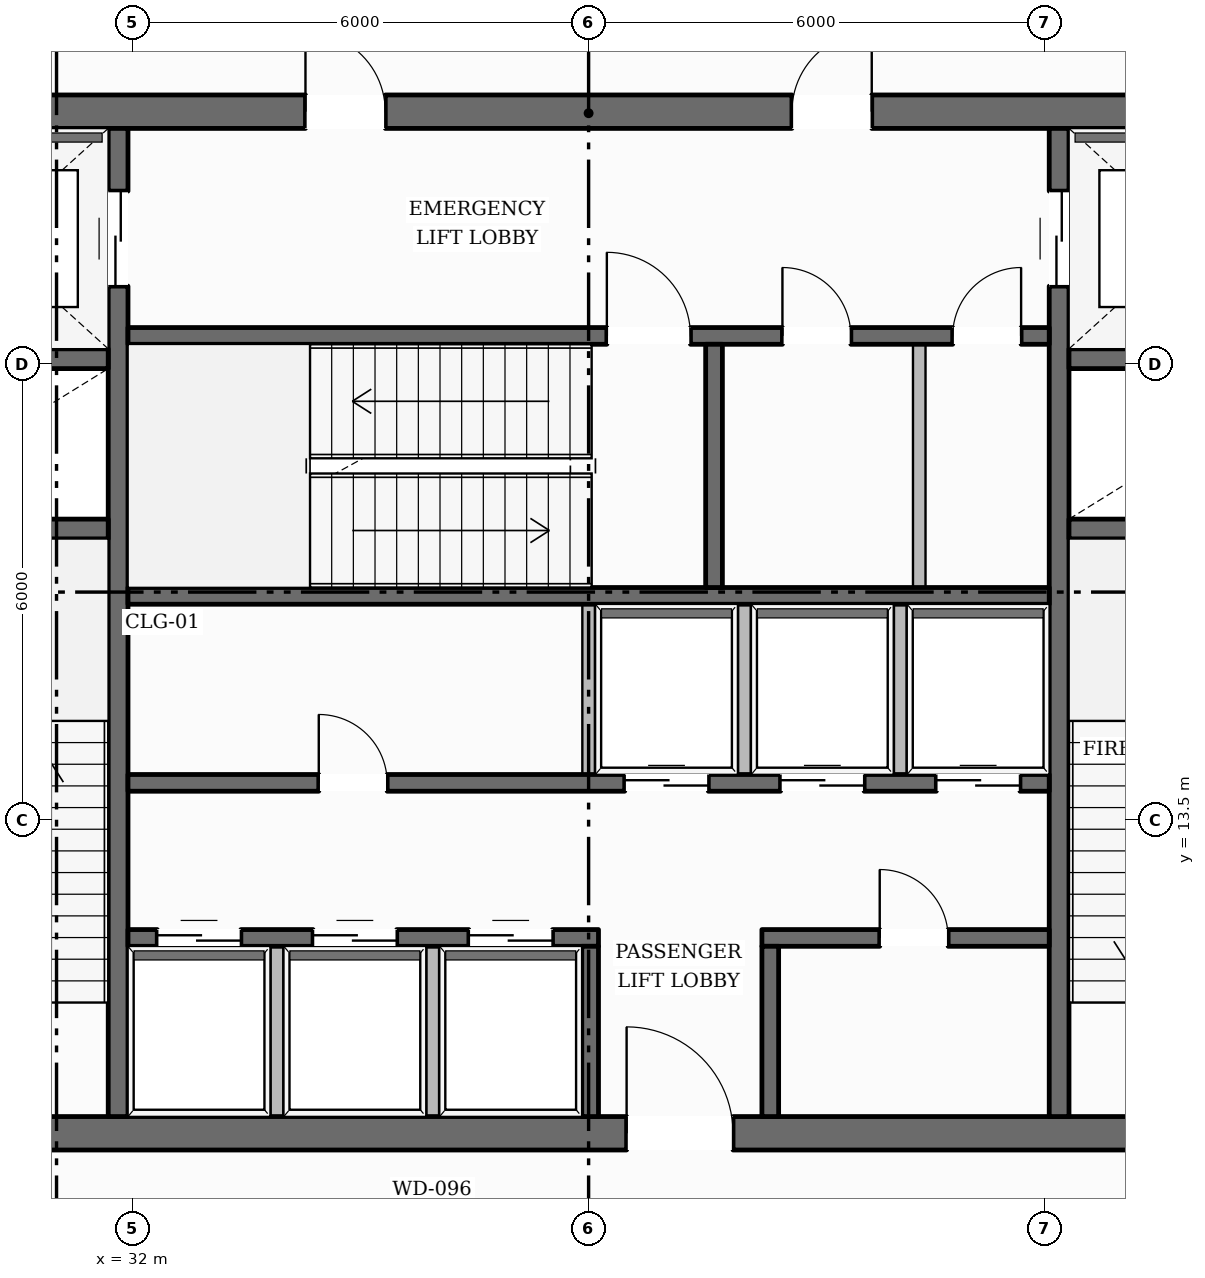
"""IFC4 building model, lengths in metres.
Left out: names, types, materials, properties, quantities, classifications, styles, units other than length and angle.
Written with IfcOpenShell. Run it as: python <this file> out.ifc"""

import sys

from ifc_helpers import new_model, si_unit, direction, frame, frame_2d, origin, place, context, subcontext, project, spatial, rectangle, extrude, element, fill, save


model = new_model("IFC4")
c1 = context("Model", 3, precision=1e-05, world=origin(), true_north=direction((0.0, 1.0)))
c2 = subcontext(c1, "Body", "Model", "MODEL_VIEW")
j1 = project(units=[si_unit("LENGTHUNIT", "METRE"), si_unit("PLANEANGLEUNIT", "RADIAN")], contexts=[c1])
p1 = place(None, origin())
s1 = spatial("IfcSite", under=j1, at=p1, CompositionType="ELEMENT")
p2 = place(p1, origin())
s2 = spatial("IfcBuilding", under=s1, at=p2, CompositionType="ELEMENT")
p3 = place(p2, frame((0.0, 0.0, 160.0)))
s3 = spatial("IfcBuildingStorey", under=s2, at=p3, CompositionType="ELEMENT", Elevation=160.0)
p4 = place(p3, frame((28.04, 9.38, 0.0), z_axis=(0.0, 0.0, 1.0), x_axis=(1.0, 0.0, 0.0)))
e1 = element("IfcWall", 1, at=p4, inside=s3, PredefinedType="SOLIDWALL", context=c2, shape_type="SweptSolid", body=[
    extrude(rectangle(XDim=19.92, YDim=0.44, at=frame_2d((9.96, 0.0))), origin(), (0.0, 0.0, 1.0), 4.75),
])
p5 = place(p4, frame((10.46, 0.0, 0.0)))
e2 = element("IfcOpeningElement", 2, at=p5, cuts=e1, PredefinedType="OPENING", context=c2, shape_type="SweptSolid", body=[
    extrude(rectangle(XDim=1.4, YDim=2.2, at=frame_2d((0.7, 1.1))), frame((0.0, 0.23, 0.0), z_axis=(0.0, -1.0, 0.0), x_axis=(1.0, 0.0, 0.0)), (0.0, 0.0, 1.0), 0.46),
])
p6 = place(p3, frame((28.04, 22.82, 0.0), z_axis=(0.0, 0.0, 1.0), x_axis=(1.0, 0.0, 0.0)))
e3 = element("IfcWall", 3, at=p6, inside=s3, PredefinedType="SOLIDWALL", context=c2, shape_type="SweptSolid", body=[
    extrude(rectangle(XDim=19.92, YDim=0.44, at=frame_2d((9.96, 0.0))), origin(), (0.0, 0.0, 1.0), 4.75),
])
p7 = place(p6, frame((6.235, 0.0, 0.0)))
e4 = element("IfcOpeningElement", 4, at=p7, cuts=e3, PredefinedType="OPENING", context=c2, shape_type="SweptSolid", body=[
    extrude(rectangle(XDim=1.05, YDim=2.15, at=frame_2d((0.525, 1.075))), frame((0.0, 0.23, 0.0), z_axis=(0.0, -1.0, 0.0), x_axis=(1.0, 0.0, 0.0)), (0.0, 0.0, 1.0), 0.46),
])
p8 = place(p6, frame((12.635, 0.0, 0.0)))
e5 = element("IfcOpeningElement", 5, at=p8, cuts=e3, PredefinedType="OPENING", context=c2, shape_type="SweptSolid", body=[
    extrude(rectangle(XDim=1.05, YDim=2.15, at=frame_2d((0.525, 1.075))), frame((0.0, 0.23, 0.0), z_axis=(0.0, -1.0, 0.0), x_axis=(1.0, 0.0, 0.0)), (0.0, 0.0, 1.0), 0.46),
])
p9 = place(p3, frame((31.81, 9.6, 0.0), z_axis=(0.0, 0.0, 1.0), x_axis=(0.0, 1.0, 0.0)))
e6 = element("IfcWall", 6, at=p9, inside=s3, PredefinedType="SHEAR", context=c2, shape_type="SweptSolid", body=[
    extrude(rectangle(XDim=13.0, YDim=0.26, at=frame_2d((6.5, 0.0))), origin(), (0.0, 0.0, 1.0), 4.75),
])
p10 = place(p9, frame((10.925, 0.0, 0.0)))
e7 = element("IfcOpeningElement", 7, at=p10, cuts=e6, PredefinedType="OPENING", context=c2, shape_type="SweptSolid", body=[
    extrude(rectangle(XDim=1.25, YDim=2.25, at=frame_2d((0.625, 1.125))), frame((0.0, 0.14, 0.0), z_axis=(0.0, -1.0, 0.0), x_axis=(1.0, 0.0, 0.0)), (0.0, 0.0, 1.0), 0.28),
])
p11 = place(p3, frame((44.19, 9.6, 0.0), z_axis=(0.0, 0.0, 1.0), x_axis=(0.0, 1.0, 0.0)))
e8 = element("IfcWall", 8, at=p11, inside=s3, PredefinedType="SHEAR", context=c2, shape_type="SweptSolid", body=[
    extrude(rectangle(XDim=13.0, YDim=0.26, at=frame_2d((6.5, 0.0))), origin(), (0.0, 0.0, 1.0), 4.75),
])
p12 = place(p11, frame((10.925, 0.0, 0.0)))
e9 = element("IfcOpeningElement", 9, at=p12, cuts=e8, PredefinedType="OPENING", context=c2, shape_type="SweptSolid", body=[
    extrude(rectangle(XDim=1.25, YDim=2.25, at=frame_2d((0.625, 1.125))), frame((0.0, 0.14, 0.0), z_axis=(0.0, -1.0, 0.0), x_axis=(1.0, 0.0, 0.0)), (0.0, 0.0, 1.0), 0.28),
])
for number, where, z_axis, x_axis in (
    (10, (28.48, 17.33, 0.0), (0.0, 0.0, 1.0), (1.0, 0.0, 0.0)),
    (11, (28.48, 19.57, 0.0), (0.0, 0.0, 1.0), (1.0, 0.0, 0.0)),
    (12, (44.32, 17.33, 0.0), (0.0, 0.0, 1.0), (1.0, 0.0, 0.0)),
    (13, (44.32, 19.57, 0.0), (0.0, 0.0, 1.0), (1.0, 0.0, 0.0)),
):
    element("IfcWall", number, at=place(p3, frame(where, z_axis=z_axis, x_axis=x_axis)), inside=s3, PredefinedType="SHEAR", context=c2, shape_type="SweptSolid", body=[
        extrude(rectangle(XDim=3.2, YDim=0.26, at=frame_2d((1.6, 0.0))), origin(), (0.0, 0.0, 1.0), 4.75),
    ])
p13 = place(p3, frame((31.94, 19.87, 0.0), z_axis=(0.0, 0.0, 1.0), x_axis=(1.0, 0.0, 0.0)))
e14 = element("IfcWall", 14, at=p13, inside=s3, PredefinedType="SOLIDWALL", context=c2, shape_type="SweptSolid", body=[
    extrude(rectangle(XDim=12.12, YDim=0.22, at=frame_2d((6.06, 0.0))), origin(), (0.0, 0.0, 1.0), 4.75),
])
p14 = place(p13, frame((6.3, 0.0, 0.0)))
e15 = element("IfcOpeningElement", 15, at=p14, cuts=e14, PredefinedType="OPENING", context=c2, shape_type="SweptSolid", body=[
    extrude(rectangle(XDim=1.1, YDim=2.15, at=frame_2d((0.55, 1.075))), frame((0.0, 0.12, 0.0), z_axis=(0.0, -1.0, 0.0), x_axis=(1.0, 0.0, 0.0)), (0.0, 0.0, 1.0), 0.24),
])
p15 = place(p13, frame((8.61, 0.0, 0.0)))
e16 = element("IfcOpeningElement", 16, at=p15, cuts=e14, PredefinedType="OPENING", context=c2, shape_type="SweptSolid", body=[
    extrude(rectangle(XDim=0.9, YDim=2.1, at=frame_2d((0.45, 1.05))), frame((0.0, 0.12, 0.0), z_axis=(0.0, -1.0, 0.0), x_axis=(1.0, 0.0, 0.0)), (0.0, 0.0, 1.0), 0.24),
])
p16 = place(p13, frame((10.85, 0.0, 0.0)))
e17 = element("IfcOpeningElement", 17, at=p16, cuts=e14, PredefinedType="OPENING", context=c2, shape_type="SweptSolid", body=[
    extrude(rectangle(XDim=0.9, YDim=2.1, at=frame_2d((0.45, 1.05))), frame((0.0, 0.12, 0.0), z_axis=(0.0, -1.0, 0.0), x_axis=(1.0, 0.0, 0.0)), (0.0, 0.0, 1.0), 0.24),
])
p17 = place(p3, frame((31.94, 16.45, 0.0), z_axis=(0.0, 0.0, 1.0), x_axis=(1.0, 0.0, 0.0)))
e18 = element("IfcWall", 18, at=p17, inside=s3, PredefinedType="SOLIDWALL", context=c2, shape_type="SweptSolid", body=[
    extrude(rectangle(XDim=12.12, YDim=0.22, at=frame_2d((6.06, 0.0))), origin(), (0.0, 0.0, 1.0), 4.75),
])
p18 = place(p3, frame((39.65, 16.56, 0.0), z_axis=(0.0, 0.0, 1.0), x_axis=(0.0, 1.0, 0.0)))
e19 = element("IfcWall", 19, at=p18, inside=s3, PredefinedType="SOLIDWALL", context=c2, shape_type="SweptSolid", body=[
    extrude(rectangle(XDim=3.2, YDim=0.22, at=frame_2d((1.6, 0.0))), origin(), (0.0, 0.0, 1.0), 4.75),
])
p19 = place(p3, frame((31.94, 13.99, 0.0), z_axis=(0.0, 0.0, 1.0), x_axis=(1.0, 0.0, 0.0)))
e20 = element("IfcWall", 20, at=p19, inside=s3, PredefinedType="SOLIDWALL", context=c2, shape_type="SweptSolid", body=[
    extrude(rectangle(XDim=12.12, YDim=0.22, at=frame_2d((6.06, 0.0))), origin(), (0.0, 0.0, 1.0), 4.75),
])
p20 = place(p19, frame((2.51, 0.0, 0.0)))
e21 = element("IfcOpeningElement", 21, at=p20, cuts=e20, PredefinedType="OPENING", context=c2, shape_type="SweptSolid", body=[
    extrude(rectangle(XDim=0.9, YDim=2.1, at=frame_2d((0.45, 1.05))), frame((0.0, 0.12, 0.0), z_axis=(0.0, -1.0, 0.0), x_axis=(1.0, 0.0, 0.0)), (0.0, 0.0, 1.0), 0.24),
])
p21 = place(p19, frame((6.535, 0.0, 0.0)))
e22 = element("IfcOpeningElement", 22, at=p21, cuts=e20, PredefinedType="OPENING", context=c2, shape_type="SweptSolid", body=[
    extrude(rectangle(XDim=1.1, YDim=2.2, at=frame_2d((0.55, 1.1))), frame((0.0, 0.12, 0.0), z_axis=(0.0, -1.0, 0.0), x_axis=(1.0, 0.0, 0.0)), (0.0, 0.0, 1.0), 0.24),
])
p22 = place(p19, frame((8.585, 0.0, 0.0)))
e23 = element("IfcOpeningElement", 23, at=p22, cuts=e20, PredefinedType="OPENING", context=c2, shape_type="SweptSolid", body=[
    extrude(rectangle(XDim=1.1, YDim=2.2, at=frame_2d((0.55, 1.1))), frame((0.0, 0.12, 0.0), z_axis=(0.0, -1.0, 0.0), x_axis=(1.0, 0.0, 0.0)), (0.0, 0.0, 1.0), 0.24),
])
p23 = place(p19, frame((10.635, 0.0, 0.0)))
e24 = element("IfcOpeningElement", 24, at=p23, cuts=e20, PredefinedType="OPENING", context=c2, shape_type="SweptSolid", body=[
    extrude(rectangle(XDim=1.1, YDim=2.2, at=frame_2d((0.55, 1.1))), frame((0.0, 0.12, 0.0), z_axis=(0.0, -1.0, 0.0), x_axis=(1.0, 0.0, 0.0)), (0.0, 0.0, 1.0), 0.24),
])
p24 = place(p3, frame((31.94, 11.95, 0.0), z_axis=(0.0, 0.0, 1.0), x_axis=(1.0, 0.0, 0.0)))
e25 = element("IfcWall", 25, at=p24, inside=s3, PredefinedType="SOLIDWALL", context=c2, shape_type="SweptSolid", body=[
    extrude(rectangle(XDim=6.19, YDim=0.22, at=frame_2d((3.095, 0.0))), origin(), (0.0, 0.0, 1.0), 4.75),
])
p25 = place(p24, frame((0.385, 0.0, 0.0)))
e26 = element("IfcOpeningElement", 26, at=p25, cuts=e25, PredefinedType="OPENING", context=c2, shape_type="SweptSolid", body=[
    extrude(rectangle(XDim=1.1, YDim=2.2, at=frame_2d((0.55, 1.1))), frame((0.0, 0.12, 0.0), z_axis=(0.0, -1.0, 0.0), x_axis=(1.0, 0.0, 0.0)), (0.0, 0.0, 1.0), 0.24),
])
p26 = place(p24, frame((2.435, 0.0, 0.0)))
e27 = element("IfcOpeningElement", 27, at=p26, cuts=e25, PredefinedType="OPENING", context=c2, shape_type="SweptSolid", body=[
    extrude(rectangle(XDim=1.1, YDim=2.2, at=frame_2d((0.55, 1.1))), frame((0.0, 0.12, 0.0), z_axis=(0.0, -1.0, 0.0), x_axis=(1.0, 0.0, 0.0)), (0.0, 0.0, 1.0), 0.24),
])
p27 = place(p24, frame((4.485, 0.0, 0.0)))
e28 = element("IfcOpeningElement", 28, at=p27, cuts=e25, PredefinedType="OPENING", context=c2, shape_type="SweptSolid", body=[
    extrude(rectangle(XDim=1.1, YDim=2.2, at=frame_2d((0.55, 1.1))), frame((0.0, 0.12, 0.0), z_axis=(0.0, -1.0, 0.0), x_axis=(1.0, 0.0, 0.0)), (0.0, 0.0, 1.0), 0.24),
])
p28 = place(p3, frame((40.28, 11.95, 0.0), z_axis=(0.0, 0.0, 1.0), x_axis=(1.0, 0.0, 0.0)))
e29 = element("IfcWall", 29, at=p28, inside=s3, PredefinedType="SOLIDWALL", context=c2, shape_type="SweptSolid", body=[
    extrude(rectangle(XDim=3.78, YDim=0.22, at=frame_2d((1.89, 0.0))), origin(), (0.0, 0.0, 1.0), 4.75),
])
p29 = place(p28, frame((1.55, 0.0, 0.0)))
e30 = element("IfcOpeningElement", 30, at=p29, cuts=e29, PredefinedType="OPENING", context=c2, shape_type="SweptSolid", body=[
    extrude(rectangle(XDim=0.9, YDim=2.1, at=frame_2d((0.45, 1.05))), frame((0.0, 0.12, 0.0), z_axis=(0.0, -1.0, 0.0), x_axis=(1.0, 0.0, 0.0)), (0.0, 0.0, 1.0), 0.24),
])
for number, where, z_axis, x_axis in (
    (31, (38.02, 9.6, 0.0), (0.0, 0.0, 1.0), (0.0, 1.0, 0.0)),
    (32, (40.39, 9.6, 0.0), (0.0, 0.0, 1.0), (0.0, 1.0, 0.0)),
):
    element("IfcWall", number, at=place(p3, frame(where, z_axis=z_axis, x_axis=x_axis)), inside=s3, PredefinedType="SOLIDWALL", context=c2, shape_type="SweptSolid", body=[
        extrude(rectangle(XDim=2.24, YDim=0.22, at=frame_2d((1.12, 0.0))), origin(), (0.0, 0.0, 1.0), 4.75),
    ])
p30 = place(p3, frame((14.827, 12.314, 0.0), z_axis=(0.0, 0.0, 1.0), x_axis=(0.495417756307, 0.868654849026, 0.0)))
e33 = element("IfcWall", 33, at=p30, inside=s3, PredefinedType="STANDARD", context=c2, shape_type="SweptSolid", body=[
    extrude(rectangle(XDim=37.012, YDim=0.35, at=frame_2d((18.506, 0.0))), origin(), (0.0, 0.0, 1.0), 4.282),
])
p31 = place(p30, frame((32.53, 0.0, 0.65)))
e34 = element("IfcOpeningElement", 34, at=p31, cuts=e33, PredefinedType="OPENING", context=c2, shape_type="SweptSolid", body=[
    extrude(rectangle(XDim=2.0, YDim=2.25, at=frame_2d((1.0, 1.125))), frame((0.0, 0.185, 0.0), z_axis=(0.0, -1.0, 0.0), x_axis=(1.0, 0.0, 0.0)), (0.0, 0.0, 1.0), 0.37),
])
p32 = place(p30, frame((2.478, 0.0, 0.65)))
e35 = element("IfcOpeningElement", 35, at=p32, cuts=e33, PredefinedType="OPENING", context=c2, shape_type="SweptSolid", body=[
    extrude(rectangle(XDim=2.0, YDim=2.25, at=frame_2d((1.0, 1.125))), frame((0.0, 0.185, 0.0), z_axis=(0.0, -1.0, 0.0), x_axis=(1.0, 0.0, 0.0)), (0.0, 0.0, 1.0), 0.37),
])
p33 = place(p3, frame((42.777, 44.5, 0.0), z_axis=(0.0, 0.0, 1.0), x_axis=(0.492483231086, -0.870321933022, 0.0)))
e36 = element("IfcWall", 36, at=p33, inside=s3, PredefinedType="STANDARD", context=c2, shape_type="SweptSolid", body=[
    extrude(rectangle(XDim=36.803, YDim=0.35, at=frame_2d((18.401, 0.0))), origin(), (0.0, 0.0, 1.0), 4.282),
])
p34 = place(p33, frame((32.343, 0.0, 0.65)))
e37 = element("IfcOpeningElement", 37, at=p34, cuts=e36, PredefinedType="OPENING", context=c2, shape_type="SweptSolid", body=[
    extrude(rectangle(XDim=2.0, YDim=2.25, at=frame_2d((1.0, 1.125))), frame((0.0, 0.185, 0.0), z_axis=(0.0, -1.0, 0.0), x_axis=(1.0, 0.0, 0.0)), (0.0, 0.0, 1.0), 0.37),
])
p35 = place(p33, frame((2.468, 0.0, 0.65)))
e38 = element("IfcOpeningElement", 38, at=p35, cuts=e36, PredefinedType="OPENING", context=c2, shape_type="SweptSolid", body=[
    extrude(rectangle(XDim=2.0, YDim=2.25, at=frame_2d((1.0, 1.125))), frame((0.0, 0.185, 0.0), z_axis=(0.0, -1.0, 0.0), x_axis=(1.0, 0.0, 0.0)), (0.0, 0.0, 1.0), 0.37),
])
for number, where, z_axis, x_axis in (
    (39, (33.9, 9.52, 0.0), (0.0, 0.0, 1.0), (0.0, 1.0, 0.0)),
    (40, (35.95, 9.52, 0.0), (0.0, 0.0, 1.0), (0.0, 1.0, 0.0)),
):
    element("IfcWall", number, at=place(p3, frame(where, z_axis=z_axis, x_axis=x_axis)), inside=s3, PredefinedType="PARTITIONING", context=c2, shape_type="SweptSolid", body=[
        extrude(rectangle(XDim=2.32, YDim=0.165, at=frame_2d((1.16, 0.0))), origin(), (0.0, 0.0, 1.0), 4.75),
    ])
for number, where, z_axis, x_axis in (
    (41, (38.0, 14.1, 0.0), (0.0, 0.0, 1.0), (0.0, 1.0, 0.0)),
    (42, (40.05, 14.1, 0.0), (0.0, 0.0, 1.0), (0.0, 1.0, 0.0)),
    (43, (42.1, 14.1, 0.0), (0.0, 0.0, 1.0), (0.0, 1.0, 0.0)),
):
    element("IfcWall", number, at=place(p3, frame(where, z_axis=z_axis, x_axis=x_axis)), inside=s3, PredefinedType="PARTITIONING", context=c2, shape_type="SweptSolid", body=[
        extrude(rectangle(XDim=2.24, YDim=0.165, at=frame_2d((1.12, 0.0))), origin(), (0.0, 0.0, 1.0), 4.75),
    ])
p36 = place(p3, frame((42.35, 16.56, 0.0), z_axis=(0.0, 0.0, 1.0), x_axis=(0.0, 1.0, 0.0)))
e44 = element("IfcWall", 44, at=p36, inside=s3, PredefinedType="PARTITIONING", context=c2, shape_type="SweptSolid", body=[
    extrude(rectangle(XDim=3.2, YDim=0.165, at=frame_2d((1.6, 0.0))), origin(), (0.0, 0.0, 1.0), 4.75),
])
p37 = place(p14, origin())
e45 = element("IfcDoor", 45, at=p37, inside=s3, OperationType="SINGLE_SWING_LEFT", PredefinedType="DOOR", context=c2, shape_type="SweptSolid", body=[
    extrude(rectangle(XDim=1.1, YDim=2.15, at=frame_2d((0.55, 1.075))), frame((0.0, 0.025, 0.0), z_axis=(0.0, -1.0, 0.0), x_axis=(1.0, 0.0, 0.0)), (0.0, 0.0, 1.0), 0.05),
])
fill(e15, e45)
p38 = place(p7, origin())
e46 = element("IfcDoor", 46, at=p38, inside=s3, OperationType="SINGLE_SWING_LEFT", PredefinedType="DOOR", context=c2, shape_type="SweptSolid", body=[
    extrude(rectangle(XDim=1.05, YDim=2.15, at=frame_2d((0.525, 1.075))), frame((0.0, 0.025, 0.0), z_axis=(0.0, -1.0, 0.0), x_axis=(1.0, 0.0, 0.0)), (0.0, 0.0, 1.0), 0.05),
])
fill(e4, e46)
p39 = place(p8, origin())
e47 = element("IfcDoor", 47, at=p39, inside=s3, OperationType="SINGLE_SWING_RIGHT", PredefinedType="DOOR", context=c2, shape_type="SweptSolid", body=[
    extrude(rectangle(XDim=1.05, YDim=2.15, at=frame_2d((0.525, 1.075))), frame((0.0, 0.025, 0.0), z_axis=(0.0, -1.0, 0.0), x_axis=(1.0, 0.0, 0.0)), (0.0, 0.0, 1.0), 0.05),
])
fill(e5, e47)
p40 = place(p10, origin())
e48 = element("IfcDoor", 48, at=p40, inside=s3, OperationType="DOUBLE_DOOR_SLIDING", PredefinedType="DOOR", context=c2, shape_type="SweptSolid", body=[
    extrude(rectangle(XDim=1.25, YDim=2.25, at=frame_2d((0.625, 1.125))), frame((0.0, 0.025, 0.0), z_axis=(0.0, -1.0, 0.0), x_axis=(1.0, 0.0, 0.0)), (0.0, 0.0, 1.0), 0.05),
])
fill(e7, e48)
p41 = place(p12, origin())
e49 = element("IfcDoor", 49, at=p41, inside=s3, OperationType="DOUBLE_DOOR_SLIDING", PredefinedType="DOOR", context=c2, shape_type="SweptSolid", body=[
    extrude(rectangle(XDim=1.25, YDim=2.25, at=frame_2d((0.625, 1.125))), frame((0.0, 0.025, 0.0), z_axis=(0.0, -1.0, 0.0), x_axis=(1.0, 0.0, 0.0)), (0.0, 0.0, 1.0), 0.05),
])
fill(e9, e49)
p42 = place(p5, origin())
e50 = element("IfcDoor", 50, at=p42, inside=s3, OperationType="SINGLE_SWING_LEFT", PredefinedType="DOOR", context=c2, shape_type="SweptSolid", body=[
    extrude(rectangle(XDim=1.4, YDim=2.2, at=frame_2d((0.7, 1.1))), frame((0.0, 0.025, 0.0), z_axis=(0.0, -1.0, 0.0), x_axis=(1.0, 0.0, 0.0)), (0.0, 0.0, 1.0), 0.05),
])
fill(e2, e50)
p43 = place(p25, origin())
e51 = element("IfcDoor", 51, at=p43, inside=s3, OperationType="DOUBLE_DOOR_SLIDING", PredefinedType="DOOR", context=c2, shape_type="SweptSolid", body=[
    extrude(rectangle(XDim=1.1, YDim=2.2, at=frame_2d((0.55, 1.1))), frame((0.0, 0.025, 0.0), z_axis=(0.0, -1.0, 0.0), x_axis=(1.0, 0.0, 0.0)), (0.0, 0.0, 1.0), 0.05),
])
fill(e26, e51)
p44 = place(p26, origin())
e52 = element("IfcDoor", 52, at=p44, inside=s3, OperationType="DOUBLE_DOOR_SLIDING", PredefinedType="DOOR", context=c2, shape_type="SweptSolid", body=[
    extrude(rectangle(XDim=1.1, YDim=2.2, at=frame_2d((0.55, 1.1))), frame((0.0, 0.025, 0.0), z_axis=(0.0, -1.0, 0.0), x_axis=(1.0, 0.0, 0.0)), (0.0, 0.0, 1.0), 0.05),
])
fill(e27, e52)
p45 = place(p27, origin())
e53 = element("IfcDoor", 53, at=p45, inside=s3, OperationType="DOUBLE_DOOR_SLIDING", PredefinedType="DOOR", context=c2, shape_type="SweptSolid", body=[
    extrude(rectangle(XDim=1.1, YDim=2.2, at=frame_2d((0.55, 1.1))), frame((0.0, 0.025, 0.0), z_axis=(0.0, -1.0, 0.0), x_axis=(1.0, 0.0, 0.0)), (0.0, 0.0, 1.0), 0.05),
])
fill(e28, e53)
p46 = place(p20, origin())
e54 = element("IfcDoor", 54, at=p46, inside=s3, OperationType="SINGLE_SWING_LEFT", PredefinedType="DOOR", context=c2, shape_type="SweptSolid", body=[
    extrude(rectangle(XDim=0.9, YDim=2.1, at=frame_2d((0.45, 1.05))), frame((0.0, 0.025, 0.0), z_axis=(0.0, -1.0, 0.0), x_axis=(1.0, 0.0, 0.0)), (0.0, 0.0, 1.0), 0.05),
])
fill(e21, e54)
p47 = place(p21, origin())
e55 = element("IfcDoor", 55, at=p47, inside=s3, OperationType="DOUBLE_DOOR_SLIDING", PredefinedType="DOOR", context=c2, shape_type="SweptSolid", body=[
    extrude(rectangle(XDim=1.1, YDim=2.2, at=frame_2d((0.55, 1.1))), frame((0.0, 0.025, 0.0), z_axis=(0.0, -1.0, 0.0), x_axis=(1.0, 0.0, 0.0)), (0.0, 0.0, 1.0), 0.05),
])
fill(e22, e55)
p48 = place(p22, origin())
e56 = element("IfcDoor", 56, at=p48, inside=s3, OperationType="DOUBLE_DOOR_SLIDING", PredefinedType="DOOR", context=c2, shape_type="SweptSolid", body=[
    extrude(rectangle(XDim=1.1, YDim=2.2, at=frame_2d((0.55, 1.1))), frame((0.0, 0.025, 0.0), z_axis=(0.0, -1.0, 0.0), x_axis=(1.0, 0.0, 0.0)), (0.0, 0.0, 1.0), 0.05),
])
fill(e23, e56)
p49 = place(p23, origin())
e57 = element("IfcDoor", 57, at=p49, inside=s3, OperationType="DOUBLE_DOOR_SLIDING", PredefinedType="DOOR", context=c2, shape_type="SweptSolid", body=[
    extrude(rectangle(XDim=1.1, YDim=2.2, at=frame_2d((0.55, 1.1))), frame((0.0, 0.025, 0.0), z_axis=(0.0, -1.0, 0.0), x_axis=(1.0, 0.0, 0.0)), (0.0, 0.0, 1.0), 0.05),
])
fill(e24, e57)
p50 = place(p15, origin())
e58 = element("IfcDoor", 58, at=p50, inside=s3, OperationType="SINGLE_SWING_LEFT", PredefinedType="DOOR", context=c2, shape_type="SweptSolid", body=[
    extrude(rectangle(XDim=0.9, YDim=2.1, at=frame_2d((0.45, 1.05))), frame((0.0, 0.025, 0.0), z_axis=(0.0, -1.0, 0.0), x_axis=(1.0, 0.0, 0.0)), (0.0, 0.0, 1.0), 0.05),
])
fill(e16, e58)
p51 = place(p16, origin())
e59 = element("IfcDoor", 59, at=p51, inside=s3, OperationType="SINGLE_SWING_RIGHT", PredefinedType="DOOR", context=c2, shape_type="SweptSolid", body=[
    extrude(rectangle(XDim=0.9, YDim=2.1, at=frame_2d((0.45, 1.05))), frame((0.0, 0.025, 0.0), z_axis=(0.0, -1.0, 0.0), x_axis=(1.0, 0.0, 0.0)), (0.0, 0.0, 1.0), 0.05),
])
fill(e17, e59)
p52 = place(p29, origin())
e60 = element("IfcDoor", 60, at=p52, inside=s3, OperationType="SINGLE_SWING_LEFT", PredefinedType="DOOR", context=c2, shape_type="SweptSolid", body=[
    extrude(rectangle(XDim=0.9, YDim=2.1, at=frame_2d((0.45, 1.05))), frame((0.0, 0.025, 0.0), z_axis=(0.0, -1.0, 0.0), x_axis=(1.0, 0.0, 0.0)), (0.0, 0.0, 1.0), 0.05),
])
fill(e30, e60)
save(model, sys.argv[1])
